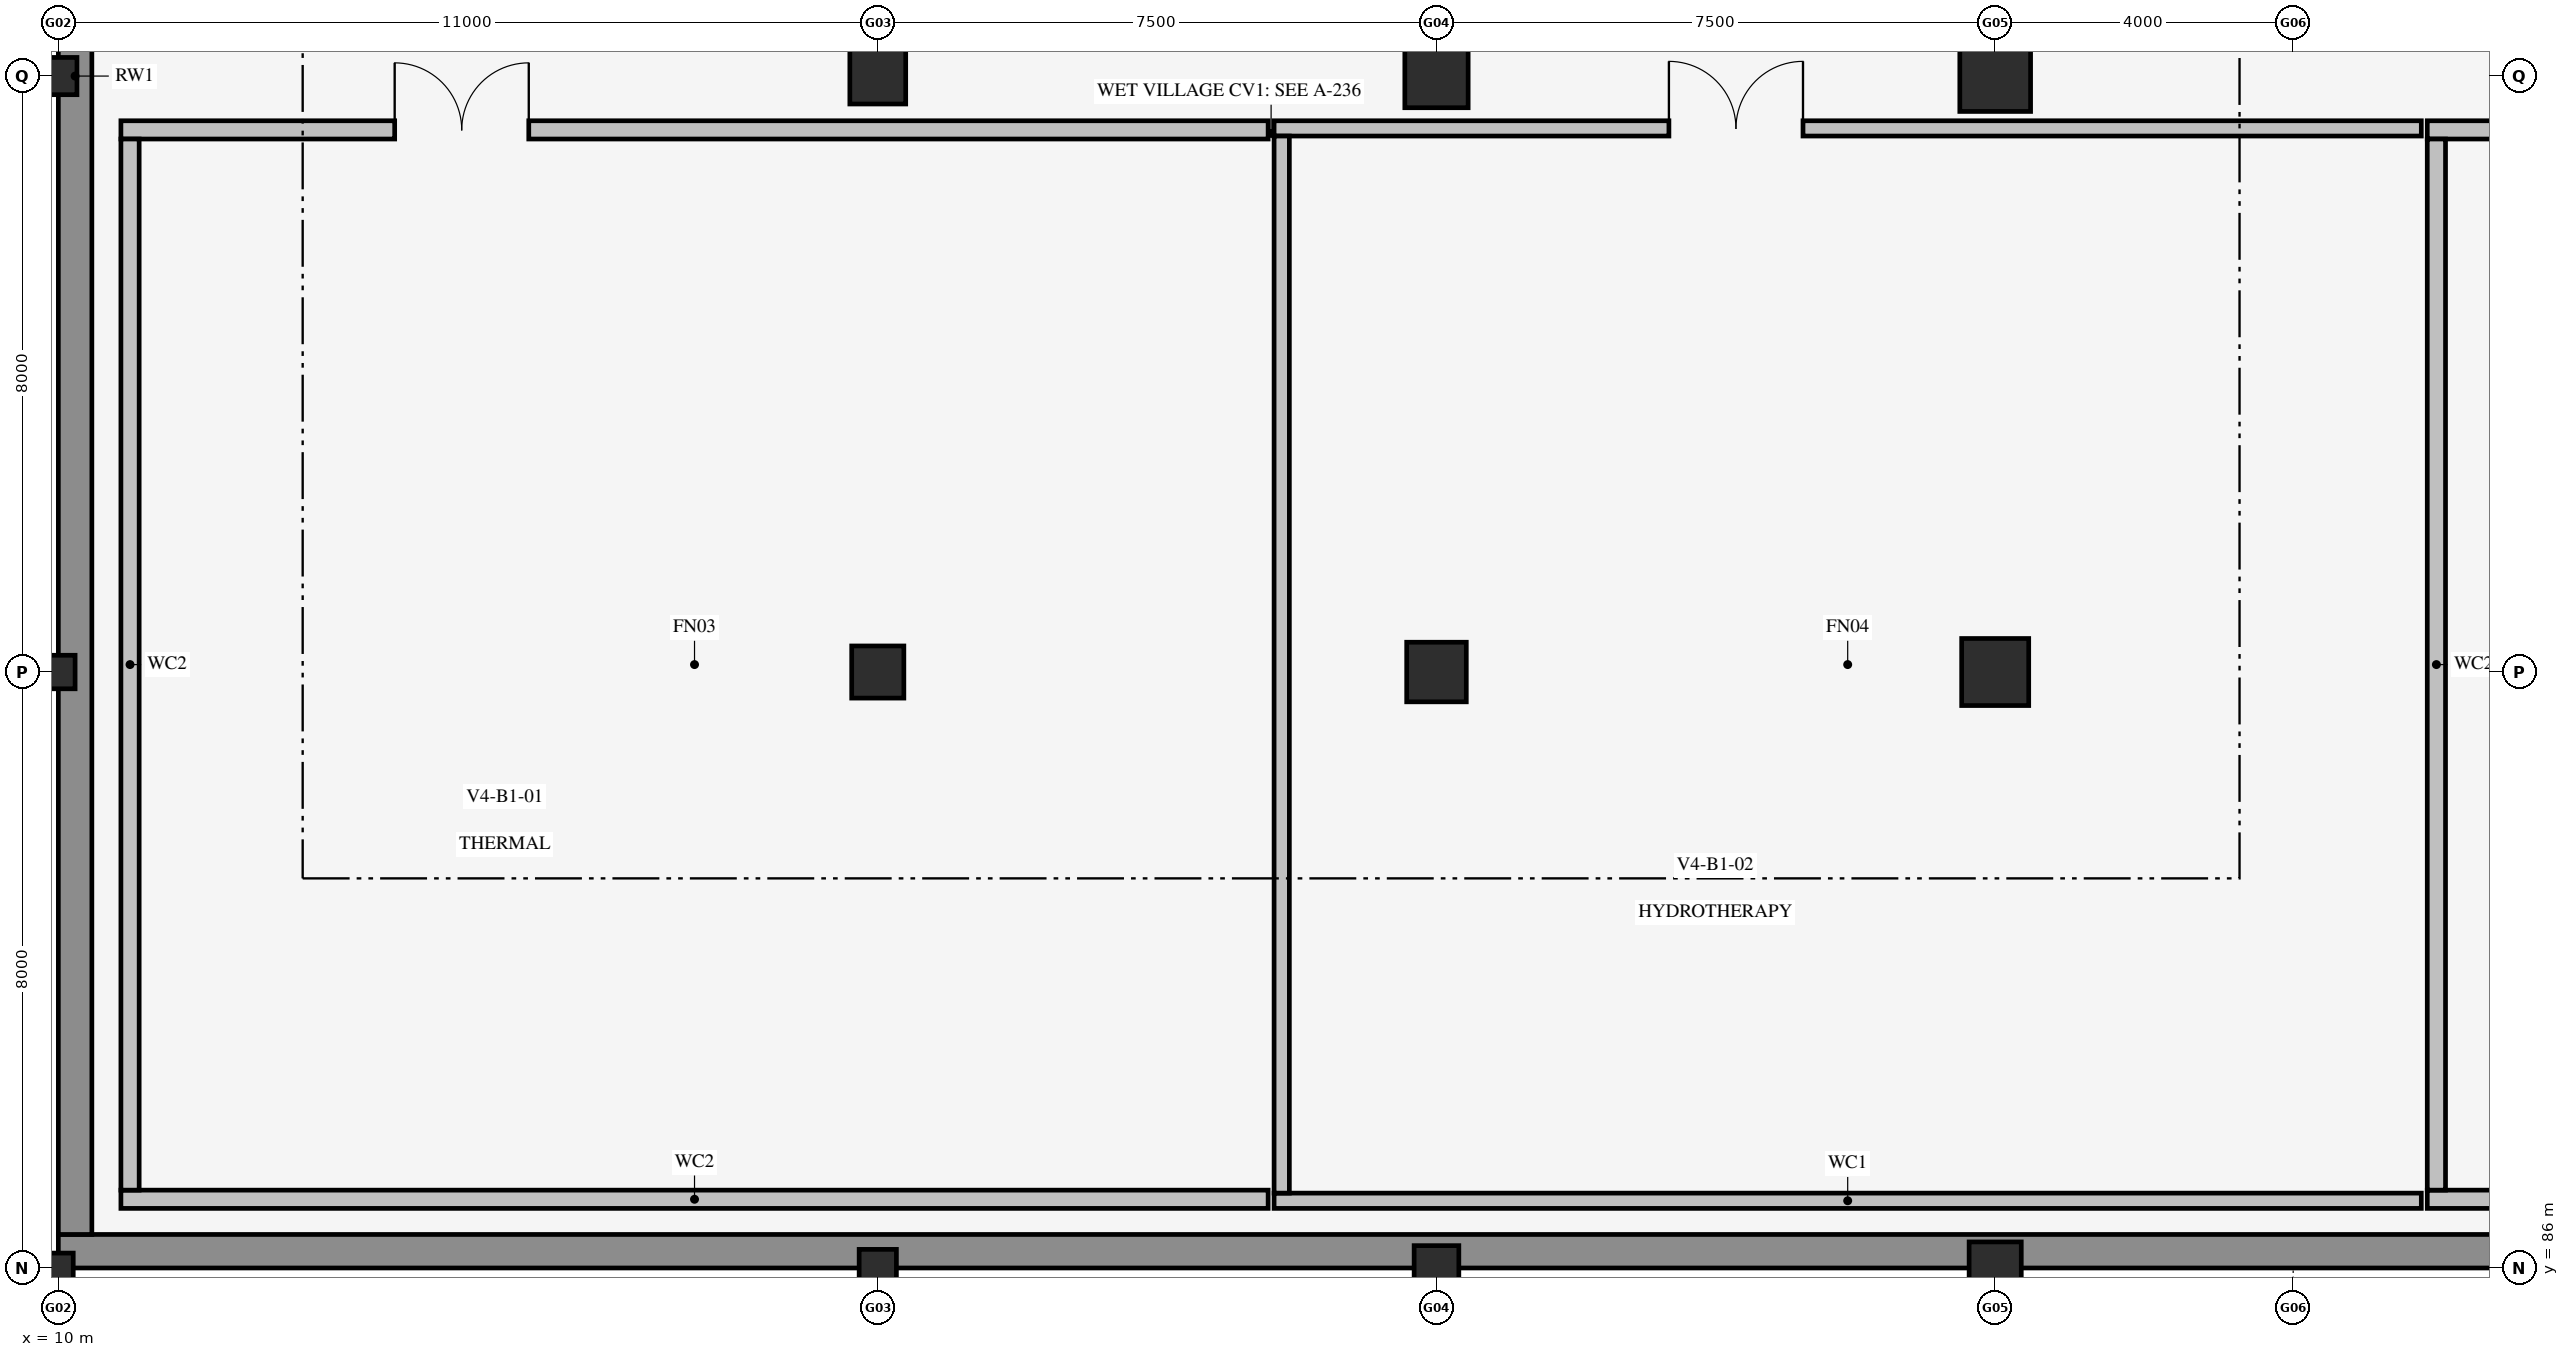
"""IFC4 building model, lengths in metres.
Left out: names, types, materials, properties, quantities, classifications, styles, units other than length and angle.
Written with IfcOpenShell. Run it as: python <this file> out.ifc"""

import sys

from ifc_helpers import new_model, si_unit, direction, frame, frame_2d, origin, origin_2d, place, context, subcontext, project, spatial, rectangle, extrude, element, fill, save


model = new_model("IFC4")
c1 = context("Model", 3, precision=1e-05, world=origin(), true_north=direction((0.0, 1.0)))
c2 = subcontext(c1, "Body", "Model", "MODEL_VIEW")
j1 = project(units=[si_unit("LENGTHUNIT", "METRE"), si_unit("PLANEANGLEUNIT", "RADIAN")], contexts=[c1])
p1 = place(None, origin())
s1 = spatial("IfcSite", under=j1, at=p1, CompositionType="ELEMENT")
p2 = place(p1, origin())
s2 = spatial("IfcBuilding", under=s1, at=p2, CompositionType="ELEMENT")
p3 = place(p2, frame((0.0, 0.0, -5.2)))
s3 = spatial("IfcBuildingStorey", under=s2, at=p3, CompositionType="ELEMENT", Elevation=-5.2)
p4 = place(p3, frame((10.0, 86.225, 0.0), z_axis=(0.0, 0.0, 1.0), x_axis=(1.0, 0.0, 0.0)))
e1 = element("IfcWall", 1, at=p4, inside=s3, PredefinedType="USERDEFINED", context=c2, shape_type="SweptSolid", body=[
    extrude(rectangle(XDim=79.0, YDim=0.45, at=frame_2d((39.5, 0.0))), origin(), (0.0, 0.0, 1.0), 4.94),
])
p5 = place(p3, frame((10.225, 86.45, 0.0), z_axis=(0.0, 0.0, 1.0), x_axis=(0.0, 1.0, 0.0)))
e2 = element("IfcWall", 2, at=p5, inside=s3, PredefinedType="USERDEFINED", context=c2, shape_type="SweptSolid", body=[
    extrude(rectangle(XDim=31.1, YDim=0.45, at=frame_2d((15.55, 0.0))), origin(), (0.0, 0.0, 1.0), 4.94),
])
p6 = place(p3, frame((10.0, 86.0, 0.0), z_axis=(0.0, 0.0, 1.0), x_axis=(1.0, 0.0, 0.0)))
e3 = element("IfcColumn", 3, at=p6, inside=s3, PredefinedType="COLUMN", context=c2, shape_type="SweptSolid", body=[
    extrude(rectangle(XDim=0.4, YDim=0.4, at=origin_2d()), origin(), (0.0, 0.0, 1.0), 5.2),
])
p7 = place(p3, frame((10.0, 94.0, 0.0), z_axis=(0.0, 0.0, 1.0), x_axis=(1.0, 0.0, 0.0)))
e4 = element("IfcColumn", 4, at=p7, inside=s3, PredefinedType="COLUMN", context=c2, shape_type="SweptSolid", body=[
    extrude(rectangle(XDim=0.45, YDim=0.45, at=origin_2d()), origin(), (0.0, 0.0, 1.0), 5.2),
])
for number, where, z_axis, x_axis in (
    (5, (10.0, 102.0, 0.0), (0.0, 0.0, 1.0), (1.0, 0.0, 0.0)),
    (6, (21.0, 86.0, 0.0), (0.0, 0.0, 1.0), (1.0, 0.0, 0.0)),
):
    element("IfcColumn", number, at=place(p3, frame(where, z_axis=z_axis, x_axis=x_axis)), inside=s3, PredefinedType="COLUMN", context=c2, shape_type="SweptSolid", body=[
        extrude(rectangle(XDim=0.5, YDim=0.5, at=origin_2d()), origin(), (0.0, 0.0, 1.0), 5.2),
    ])
p8 = place(p3, frame((21.0, 94.0, 0.0), z_axis=(0.0, 0.0, 1.0), x_axis=(1.0, 0.0, 0.0)))
e7 = element("IfcColumn", 7, at=p8, inside=s3, PredefinedType="COLUMN", context=c2, shape_type="SweptSolid", body=[
    extrude(rectangle(XDim=0.7, YDim=0.7, at=origin_2d()), origin(), (0.0, 0.0, 1.0), 5.2),
])
p9 = place(p3, frame((21.0, 102.0, 0.0), z_axis=(0.0, 0.0, 1.0), x_axis=(1.0, 0.0, 0.0)))
e8 = element("IfcColumn", 8, at=p9, inside=s3, PredefinedType="COLUMN", context=c2, shape_type="SweptSolid", body=[
    extrude(rectangle(XDim=0.75, YDim=0.75, at=origin_2d()), origin(), (0.0, 0.0, 1.0), 5.2),
])
p10 = place(p3, frame((28.5, 86.0, 0.0), z_axis=(0.0, 0.0, 1.0), x_axis=(1.0, 0.0, 0.0)))
e9 = element("IfcColumn", 9, at=p10, inside=s3, PredefinedType="COLUMN", context=c2, shape_type="SweptSolid", body=[
    extrude(rectangle(XDim=0.6, YDim=0.6, at=origin_2d()), origin(), (0.0, 0.0, 1.0), 5.2),
])
p11 = place(p3, frame((28.5, 94.0, 0.0), z_axis=(0.0, 0.0, 1.0), x_axis=(1.0, 0.0, 0.0)))
e10 = element("IfcColumn", 10, at=p11, inside=s3, PredefinedType="COLUMN", context=c2, shape_type="SweptSolid", body=[
    extrude(rectangle(XDim=0.8, YDim=0.8, at=origin_2d()), origin(), (0.0, 0.0, 1.0), 5.2),
])
p12 = place(p3, frame((28.5, 102.0, 0.0), z_axis=(0.0, 0.0, 1.0), x_axis=(1.0, 0.0, 0.0)))
e11 = element("IfcColumn", 11, at=p12, inside=s3, PredefinedType="COLUMN", context=c2, shape_type="SweptSolid", body=[
    extrude(rectangle(XDim=0.85, YDim=0.85, at=origin_2d()), origin(), (0.0, 0.0, 1.0), 5.2),
])
p13 = place(p3, frame((36.0, 86.0, 0.0), z_axis=(0.0, 0.0, 1.0), x_axis=(1.0, 0.0, 0.0)))
e12 = element("IfcColumn", 12, at=p13, inside=s3, PredefinedType="COLUMN", context=c2, shape_type="SweptSolid", body=[
    extrude(rectangle(XDim=0.7, YDim=0.7, at=origin_2d()), origin(), (0.0, 0.0, 1.0), 5.2),
])
p14 = place(p3, frame((36.0, 94.0, 0.0), z_axis=(0.0, 0.0, 1.0), x_axis=(1.0, 0.0, 0.0)))
e13 = element("IfcColumn", 13, at=p14, inside=s3, PredefinedType="COLUMN", context=c2, shape_type="SweptSolid", body=[
    extrude(rectangle(XDim=0.9, YDim=0.9, at=origin_2d()), origin(), (0.0, 0.0, 1.0), 5.2),
])
p15 = place(p3, frame((36.0, 102.0, 0.0), z_axis=(0.0, 0.0, 1.0), x_axis=(1.0, 0.0, 0.0)))
e14 = element("IfcColumn", 14, at=p15, inside=s3, PredefinedType="COLUMN", context=c2, shape_type="SweptSolid", body=[
    extrude(rectangle(XDim=0.95, YDim=0.95, at=origin_2d()), origin(), (0.0, 0.0, 1.0), 5.2),
])
p16 = place(p3, frame((10.84, 86.923, 0.0), z_axis=(0.0, 0.0, 1.0), x_axis=(1.0, 0.0, 0.0)))
e15 = element("IfcWall", 15, at=p16, inside=s3, PredefinedType="SOLIDWALL", context=c2, shape_type="SweptSolid", body=[
    extrude(rectangle(XDim=15.4, YDim=0.245, at=frame_2d((7.7, 0.0))), origin(), (0.0, 0.0, 1.0), 4.925),
])
p17 = place(p3, frame((10.84, 101.278, 0.0), z_axis=(0.0, 0.0, 1.0), x_axis=(1.0, 0.0, 0.0)))
e16 = element("IfcWall", 16, at=p17, inside=s3, PredefinedType="SOLIDWALL", context=c2, shape_type="SweptSolid", body=[
    extrude(rectangle(XDim=15.4, YDim=0.245, at=frame_2d((7.7, 0.0))), origin(), (0.0, 0.0, 1.0), 4.925),
])
p18 = place(p17, frame((3.675, 0.0, 0.0)))
e17 = element("IfcOpeningElement", 17, at=p18, cuts=e16, PredefinedType="OPENING", context=c2, shape_type="SweptSolid", body=[
    extrude(rectangle(XDim=1.8, YDim=2.35, at=frame_2d((0.9, 1.175))), frame((0.0, 0.135, 0.0), z_axis=(0.0, -1.0, 0.0), x_axis=(1.0, 0.0, 0.0)), (0.0, 0.0, 1.0), 0.269),
])
p19 = place(p3, frame((10.962, 87.045, 0.0), z_axis=(0.0, 0.0, 1.0), x_axis=(0.0, 1.0, 0.0)))
e18 = element("IfcWall", 18, at=p19, inside=s3, PredefinedType="SOLIDWALL", context=c2, shape_type="SweptSolid", body=[
    extrude(rectangle(XDim=14.11, YDim=0.245, at=frame_2d((7.055, 0.0))), origin(), (0.0, 0.0, 1.0), 4.925),
])
p20 = place(p3, frame((26.32, 86.903, 0.0), z_axis=(0.0, 0.0, 1.0), x_axis=(1.0, 0.0, 0.0)))
e19 = element("IfcWall", 19, at=p20, inside=s3, PredefinedType="SOLIDWALL", context=c2, shape_type="SweptSolid", body=[
    extrude(rectangle(XDim=15.4, YDim=0.205, at=frame_2d((7.7, 0.0))), origin(), (0.0, 0.0, 1.0), 4.925),
])
p21 = place(p3, frame((26.32, 101.298, 0.0), z_axis=(0.0, 0.0, 1.0), x_axis=(1.0, 0.0, 0.0)))
e20 = element("IfcWall", 20, at=p21, inside=s3, PredefinedType="SOLIDWALL", context=c2, shape_type="SweptSolid", body=[
    extrude(rectangle(XDim=15.4, YDim=0.205, at=frame_2d((7.7, 0.0))), origin(), (0.0, 0.0, 1.0), 4.925),
])
p22 = place(p21, frame((5.3, 0.0, 0.0)))
e21 = element("IfcOpeningElement", 21, at=p22, cuts=e20, PredefinedType="OPENING", context=c2, shape_type="SweptSolid", body=[
    extrude(rectangle(XDim=1.8, YDim=2.35, at=frame_2d((0.9, 1.175))), frame((0.0, 0.115, 0.0), z_axis=(0.0, -1.0, 0.0), x_axis=(1.0, 0.0, 0.0)), (0.0, 0.0, 1.0), 0.229),
])
p23 = place(p3, frame((26.423, 87.005, 0.0), z_axis=(0.0, 0.0, 1.0), x_axis=(0.0, 1.0, 0.0)))
e22 = element("IfcWall", 22, at=p23, inside=s3, PredefinedType="SOLIDWALL", context=c2, shape_type="SweptSolid", body=[
    extrude(rectangle(XDim=14.19, YDim=0.205, at=frame_2d((7.095, 0.0))), origin(), (0.0, 0.0, 1.0), 4.925),
])
p24 = place(p3, frame((41.8, 86.923, 0.0), z_axis=(0.0, 0.0, 1.0), x_axis=(1.0, 0.0, 0.0)))
e23 = element("IfcWall", 23, at=p24, inside=s3, PredefinedType="SOLIDWALL", context=c2, shape_type="SweptSolid", body=[
    extrude(rectangle(XDim=15.4, YDim=0.245, at=frame_2d((7.7, 0.0))), origin(), (0.0, 0.0, 1.0), 4.925),
])
p25 = place(p3, frame((41.8, 101.278, 0.0), z_axis=(0.0, 0.0, 1.0), x_axis=(1.0, 0.0, 0.0)))
e24 = element("IfcWall", 24, at=p25, inside=s3, PredefinedType="SOLIDWALL", context=c2, shape_type="SweptSolid", body=[
    extrude(rectangle(XDim=15.4, YDim=0.245, at=frame_2d((7.7, 0.0))), origin(), (0.0, 0.0, 1.0), 4.925),
])
p26 = place(p25, frame((6.8, 0.0, 0.0)))
e25 = element("IfcOpeningElement", 25, at=p26, cuts=e24, PredefinedType="OPENING", context=c2, shape_type="SweptSolid", body=[
    extrude(rectangle(XDim=1.8, YDim=2.35, at=frame_2d((0.9, 1.175))), frame((0.0, 0.135, 0.0), z_axis=(0.0, -1.0, 0.0), x_axis=(1.0, 0.0, 0.0)), (0.0, 0.0, 1.0), 0.269),
])
p27 = place(p3, frame((41.923, 87.045, 0.0), z_axis=(0.0, 0.0, 1.0), x_axis=(0.0, 1.0, 0.0)))
e26 = element("IfcWall", 26, at=p27, inside=s3, PredefinedType="SOLIDWALL", context=c2, shape_type="SweptSolid", body=[
    extrude(rectangle(XDim=14.11, YDim=0.245, at=frame_2d((7.055, 0.0))), origin(), (0.0, 0.0, 1.0), 4.925),
])
p28 = place(p18, frame((1.8, 0.0, 0.0), z_axis=(0.0, 0.0, 1.0), x_axis=(-1.0, 0.0, 0.0)))
e27 = element("IfcDoor", 27, at=p28, inside=s3, OperationType="DOUBLE_DOOR_SINGLE_SWING", PredefinedType="DOOR", context=c2, shape_type="SweptSolid", body=[
    extrude(rectangle(XDim=1.8, YDim=2.35, at=frame_2d((0.9, 1.175))), frame((0.0, 0.025, 0.0), z_axis=(0.0, -1.0, 0.0), x_axis=(1.0, 0.0, 0.0)), (0.0, 0.0, 1.0), 0.05),
])
fill(e17, e27)
p29 = place(p22, frame((1.8, 0.0, 0.0), z_axis=(0.0, 0.0, 1.0), x_axis=(-1.0, 0.0, 0.0)))
e28 = element("IfcDoor", 28, at=p29, inside=s3, OperationType="DOUBLE_DOOR_SINGLE_SWING", PredefinedType="DOOR", context=c2, shape_type="SweptSolid", body=[
    extrude(rectangle(XDim=1.8, YDim=2.35, at=frame_2d((0.9, 1.175))), frame((0.0, 0.025, 0.0), z_axis=(0.0, -1.0, 0.0), x_axis=(1.0, 0.0, 0.0)), (0.0, 0.0, 1.0), 0.05),
])
fill(e21, e28)
save(model, sys.argv[1])
